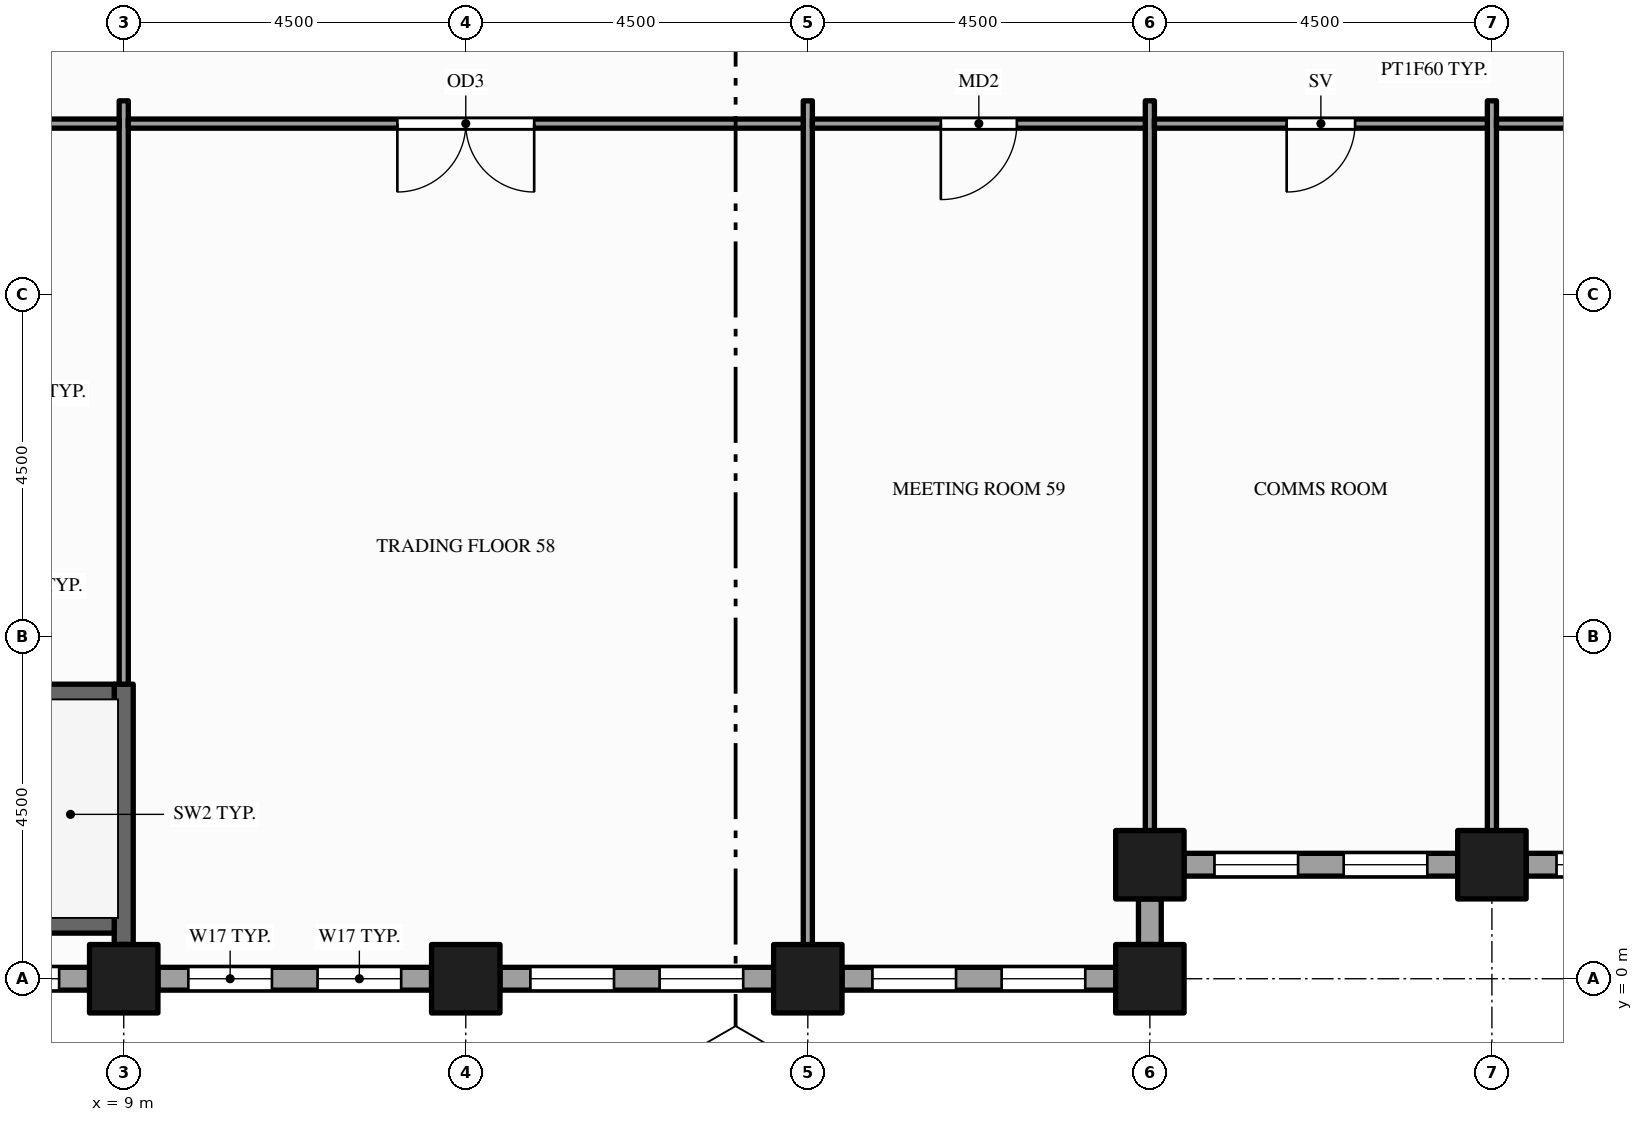
"""IFC4 building model, lengths in metres.
Left out: names, types, materials, properties, quantities, classifications, styles, units other than length and angle.
Written with IfcOpenShell. Run it as: python <this file> out.ifc"""

import sys

from ifc_helpers import new_model, si_unit, direction, frame, frame_2d, origin, origin_2d, place, context, subcontext, project, spatial, rectangle, hollow_rectangle, extrude, element, fill, save


model = new_model("IFC4")
c1 = context("Model", 3, precision=1e-05, world=origin(), true_north=direction((0.0, 1.0)))
c2 = subcontext(c1, "Body", "Model", "MODEL_VIEW")
j1 = project(units=[si_unit("LENGTHUNIT", "METRE"), si_unit("PLANEANGLEUNIT", "RADIAN")], contexts=[c1])
p1 = place(None, origin())
s1 = spatial("IfcSite", under=j1, at=p1, CompositionType="ELEMENT")
p2 = place(p1, origin())
s2 = spatial("IfcBuilding", under=s1, at=p2, CompositionType="ELEMENT")
p3 = place(p2, frame((0.0, 0.0, 155.0)))
s3 = spatial("IfcBuildingStorey", under=s2, at=p3, CompositionType="ELEMENT", Elevation=155.0)
for number, where, z_axis, x_axis in (
    (1, (9.0, 0.0, -0.15), (0.0, 0.0, 1.0), (1.0, 0.0, 0.0)),
    (2, (13.5, 0.0, -0.15), (0.0, 0.0, 1.0), (1.0, 0.0, 0.0)),
    (3, (18.0, 0.0, -0.15), (0.0, 0.0, 1.0), (1.0, 0.0, 0.0)),
    (4, (22.5, 0.0, -0.15), (0.0, 0.0, 1.0), (1.0, 0.0, 0.0)),
    (5, (22.5, 1.5, -0.15), (0.0, 0.0, 1.0), (1.0, 0.0, 0.0)),
    (6, (27.0, 1.5, -0.15), (0.0, 0.0, 1.0), (1.0, 0.0, 0.0)),
):
    element("IfcColumn", number, at=place(p3, frame(where, z_axis=z_axis, x_axis=x_axis)), inside=s3, PredefinedType="COLUMN", context=c2, shape_type="SweptSolid", body=[
        extrude(hollow_rectangle(XDim=0.9, YDim=0.9, WallThickness=0.045, at=origin_2d()), origin(), (0.0, 0.0, 1.0), 4.0),
    ])
p4 = place(p3, frame((4.95, 0.0, 0.0), z_axis=(0.0, 0.0, 1.0), x_axis=(1.0, 0.0, 0.0)))
e7 = element("IfcWall", 7, at=p4, inside=s3, PredefinedType="STANDARD", context=c2, shape_type="SweptSolid", body=[
    extrude(rectangle(XDim=3.6, YDim=0.3, at=frame_2d((1.8, 0.0))), origin(), (0.0, 0.0, 1.0), 3.149),
])
p5 = place(p4, frame((0.4, 0.0, 0.9)))
e8 = element("IfcOpeningElement", 8, at=p5, cuts=e7, PredefinedType="OPENING", context=c2, shape_type="SweptSolid", body=[
    extrude(rectangle(XDim=1.1, YDim=2.0, at=frame_2d((0.55, 1.0))), frame((0.0, 0.16, 0.0), z_axis=(0.0, -1.0, 0.0), x_axis=(1.0, 0.0, 0.0)), (0.0, 0.0, 1.0), 0.32),
])
p6 = place(p4, frame((2.1, 0.0, 0.9)))
e9 = element("IfcOpeningElement", 9, at=p6, cuts=e7, PredefinedType="OPENING", context=c2, shape_type="SweptSolid", body=[
    extrude(rectangle(XDim=1.1, YDim=2.0, at=frame_2d((0.55, 1.0))), frame((0.0, 0.16, 0.0), z_axis=(0.0, -1.0, 0.0), x_axis=(1.0, 0.0, 0.0)), (0.0, 0.0, 1.0), 0.32),
])
p7 = place(p3, frame((9.45, 0.0, 0.0), z_axis=(0.0, 0.0, 1.0), x_axis=(1.0, 0.0, 0.0)))
e10 = element("IfcWall", 10, at=p7, inside=s3, PredefinedType="STANDARD", context=c2, shape_type="SweptSolid", body=[
    extrude(rectangle(XDim=3.6, YDim=0.3, at=frame_2d((1.8, 0.0))), origin(), (0.0, 0.0, 1.0), 2.87),
])
p8 = place(p7, frame((0.4, 0.0, 0.9)))
e11 = element("IfcOpeningElement", 11, at=p8, cuts=e10, PredefinedType="OPENING", context=c2, shape_type="SweptSolid", body=[
    extrude(rectangle(XDim=1.1, YDim=1.75, at=frame_2d((0.55, 0.875))), frame((0.0, 0.16, 0.0), z_axis=(0.0, -1.0, 0.0), x_axis=(1.0, 0.0, 0.0)), (0.0, 0.0, 1.0), 0.32),
])
p9 = place(p7, frame((2.1, 0.0, 0.9)))
e12 = element("IfcOpeningElement", 12, at=p9, cuts=e10, PredefinedType="OPENING", context=c2, shape_type="SweptSolid", body=[
    extrude(rectangle(XDim=1.1, YDim=1.75, at=frame_2d((0.55, 0.875))), frame((0.0, 0.16, 0.0), z_axis=(0.0, -1.0, 0.0), x_axis=(1.0, 0.0, 0.0)), (0.0, 0.0, 1.0), 0.32),
])
p10 = place(p3, frame((13.95, 0.0, 0.0), z_axis=(0.0, 0.0, 1.0), x_axis=(1.0, 0.0, 0.0)))
e13 = element("IfcWall", 13, at=p10, inside=s3, PredefinedType="STANDARD", context=c2, shape_type="SweptSolid", body=[
    extrude(rectangle(XDim=3.6, YDim=0.3, at=frame_2d((1.8, 0.0))), origin(), (0.0, 0.0, 1.0), 2.87),
])
p11 = place(p10, frame((0.4, 0.0, 0.9)))
e14 = element("IfcOpeningElement", 14, at=p11, cuts=e13, PredefinedType="OPENING", context=c2, shape_type="SweptSolid", body=[
    extrude(rectangle(XDim=1.1, YDim=1.75, at=frame_2d((0.55, 0.875))), frame((0.0, 0.16, 0.0), z_axis=(0.0, -1.0, 0.0), x_axis=(1.0, 0.0, 0.0)), (0.0, 0.0, 1.0), 0.32),
])
p12 = place(p10, frame((2.1, 0.0, 0.9)))
e15 = element("IfcOpeningElement", 15, at=p12, cuts=e13, PredefinedType="OPENING", context=c2, shape_type="SweptSolid", body=[
    extrude(rectangle(XDim=1.1, YDim=1.75, at=frame_2d((0.55, 0.875))), frame((0.0, 0.16, 0.0), z_axis=(0.0, -1.0, 0.0), x_axis=(1.0, 0.0, 0.0)), (0.0, 0.0, 1.0), 0.32),
])
p13 = place(p3, frame((18.45, 0.0, 0.0), z_axis=(0.0, 0.0, 1.0), x_axis=(1.0, 0.0, 0.0)))
e16 = element("IfcWall", 16, at=p13, inside=s3, PredefinedType="STANDARD", context=c2, shape_type="SweptSolid", body=[
    extrude(rectangle(XDim=3.6, YDim=0.3, at=frame_2d((1.8, 0.0))), origin(), (0.0, 0.0, 1.0), 2.87),
])
p14 = place(p13, frame((0.4, 0.0, 0.9)))
e17 = element("IfcOpeningElement", 17, at=p14, cuts=e16, PredefinedType="OPENING", context=c2, shape_type="SweptSolid", body=[
    extrude(rectangle(XDim=1.1, YDim=1.75, at=frame_2d((0.55, 0.875))), frame((0.0, 0.16, 0.0), z_axis=(0.0, -1.0, 0.0), x_axis=(1.0, 0.0, 0.0)), (0.0, 0.0, 1.0), 0.32),
])
p15 = place(p13, frame((2.1, 0.0, 0.9)))
e18 = element("IfcOpeningElement", 18, at=p15, cuts=e16, PredefinedType="OPENING", context=c2, shape_type="SweptSolid", body=[
    extrude(rectangle(XDim=1.1, YDim=1.75, at=frame_2d((0.55, 0.875))), frame((0.0, 0.16, 0.0), z_axis=(0.0, -1.0, 0.0), x_axis=(1.0, 0.0, 0.0)), (0.0, 0.0, 1.0), 0.32),
])
p16 = place(p3, frame((22.5, 0.45, 0.0), z_axis=(0.0, 0.0, 1.0), x_axis=(0.0, 1.0, 0.0)))
e19 = element("IfcWall", 19, at=p16, inside=s3, PredefinedType="STANDARD", context=c2, shape_type="SweptSolid", body=[
    extrude(rectangle(XDim=0.6, YDim=0.3, at=frame_2d((0.3, 0.0))), origin(), (0.0, 0.0, 1.0), 3.149),
])
p17 = place(p3, frame((22.95, 1.5, 0.0), z_axis=(0.0, 0.0, 1.0), x_axis=(1.0, 0.0, 0.0)))
e20 = element("IfcWall", 20, at=p17, inside=s3, PredefinedType="STANDARD", context=c2, shape_type="SweptSolid", body=[
    extrude(rectangle(XDim=3.6, YDim=0.3, at=frame_2d((1.8, 0.0))), origin(), (0.0, 0.0, 1.0), 2.87),
])
p18 = place(p17, frame((0.4, 0.0, 0.9)))
e21 = element("IfcOpeningElement", 21, at=p18, cuts=e20, PredefinedType="OPENING", context=c2, shape_type="SweptSolid", body=[
    extrude(rectangle(XDim=1.1, YDim=1.75, at=frame_2d((0.55, 0.875))), frame((0.0, 0.16, 0.0), z_axis=(0.0, -1.0, 0.0), x_axis=(1.0, 0.0, 0.0)), (0.0, 0.0, 1.0), 0.32),
])
p19 = place(p17, frame((2.1, 0.0, 0.9)))
e22 = element("IfcOpeningElement", 22, at=p19, cuts=e20, PredefinedType="OPENING", context=c2, shape_type="SweptSolid", body=[
    extrude(rectangle(XDim=1.1, YDim=1.75, at=frame_2d((0.55, 0.875))), frame((0.0, 0.16, 0.0), z_axis=(0.0, -1.0, 0.0), x_axis=(1.0, 0.0, 0.0)), (0.0, 0.0, 1.0), 0.32),
])
p20 = place(p3, frame((27.45, 1.5, 0.0), z_axis=(0.0, 0.0, 1.0), x_axis=(1.0, 0.0, 0.0)))
e23 = element("IfcWall", 23, at=p20, inside=s3, PredefinedType="STANDARD", context=c2, shape_type="SweptSolid", body=[
    extrude(rectangle(XDim=3.6, YDim=0.3, at=frame_2d((1.8, 0.0))), origin(), (0.0, 0.0, 1.0), 2.87),
])
p21 = place(p20, frame((0.4, 0.0, 0.9)))
e24 = element("IfcOpeningElement", 24, at=p21, cuts=e23, PredefinedType="OPENING", context=c2, shape_type="SweptSolid", body=[
    extrude(rectangle(XDim=1.1, YDim=1.75, at=frame_2d((0.55, 0.875))), frame((0.0, 0.16, 0.0), z_axis=(0.0, -1.0, 0.0), x_axis=(1.0, 0.0, 0.0)), (0.0, 0.0, 1.0), 0.32),
])
p22 = place(p20, frame((2.1, 0.0, 0.9)))
e25 = element("IfcOpeningElement", 25, at=p22, cuts=e23, PredefinedType="OPENING", context=c2, shape_type="SweptSolid", body=[
    extrude(rectangle(XDim=1.1, YDim=1.75, at=frame_2d((0.55, 0.875))), frame((0.0, 0.16, 0.0), z_axis=(0.0, -1.0, 0.0), x_axis=(1.0, 0.0, 0.0)), (0.0, 0.0, 1.0), 0.32),
])
p23 = place(p3, frame((9.0, 0.15, 0.0), z_axis=(0.0, 0.0, 1.0), x_axis=(0.0, 1.0, 0.0)))
e26 = element("IfcWall", 26, at=p23, inside=s3, PredefinedType="PARTITIONING", context=c2, shape_type="SweptSolid", body=[
    extrude(rectangle(XDim=0.3, YDim=0.12, at=frame_2d((0.15, 0.0))), origin(), (0.0, 0.0, 1.0), 3.85),
])
p24 = place(p3, frame((9.0, 0.45, 0.0), z_axis=(0.0, 0.0, 1.0), x_axis=(0.0, 1.0, 0.0)))
e27 = element("IfcWall", 27, at=p24, inside=s3, PredefinedType="SHEAR", context=c2, shape_type="SweptSolid", body=[
    extrude(rectangle(XDim=3.425, YDim=0.25, at=frame_2d((1.712, 0.0))), origin(), (0.0, 0.0, 1.0), 3.85),
])
p25 = place(p3, frame((9.0, 3.875, 0.0), z_axis=(0.0, 0.0, 1.0), x_axis=(0.0, 1.0, 0.0)))
e28 = element("IfcWall", 28, at=p25, inside=s3, PredefinedType="PARTITIONING", context=c2, shape_type="SweptSolid", body=[
    extrude(rectangle(XDim=7.675, YDim=0.12, at=frame_2d((3.837, 0.0))), origin(), (0.0, 0.0, 1.0), 2.87),
])
p26 = place(p3, frame((18.0, 0.15, 0.0), z_axis=(0.0, 0.0, 1.0), x_axis=(0.0, 1.0, 0.0)))
e29 = element("IfcWall", 29, at=p26, inside=s3, PredefinedType="PARTITIONING", context=c2, shape_type="SweptSolid", body=[
    extrude(rectangle(XDim=11.4, YDim=0.12, at=frame_2d((5.7, 0.0))), origin(), (0.0, 0.0, 1.0), 2.87),
])
for number, where, z_axis, x_axis in (
    (30, (22.5, 1.65, 0.0), (0.0, 0.0, 1.0), (0.0, 1.0, 0.0)),
    (31, (27.0, 1.65, 0.0), (0.0, 0.0, 1.0), (0.0, 1.0, 0.0)),
):
    element("IfcWall", number, at=place(p3, frame(where, z_axis=z_axis, x_axis=x_axis)), inside=s3, PredefinedType="PARTITIONING", context=c2, shape_type="SweptSolid", body=[
        extrude(rectangle(XDim=9.9, YDim=0.12, at=frame_2d((4.95, 0.0))), origin(), (0.0, 0.0, 1.0), 2.87),
    ])
p27 = place(p3, frame((0.85, 0.725, 0.0), z_axis=(0.0, 0.0, 1.0), x_axis=(1.0, 0.0, 0.0)))
e32 = element("IfcWall", 32, at=p27, inside=s3, PredefinedType="SHEAR", context=c2, shape_type="SweptSolid", body=[
    extrude(rectangle(XDim=8.025, YDim=0.25, at=frame_2d((4.012, 0.0))), origin(), (0.0, 0.0, 1.0), 3.85),
])
p28 = place(p3, frame((0.85, 3.75, 0.0), z_axis=(0.0, 0.0, 1.0), x_axis=(1.0, 0.0, 0.0)))
e33 = element("IfcWall", 33, at=p28, inside=s3, PredefinedType="SHEAR", context=c2, shape_type="SweptSolid", body=[
    extrude(rectangle(XDim=8.025, YDim=0.25, at=frame_2d((4.012, 0.0))), origin(), (0.0, 0.0, 1.0), 3.85),
])
p29 = place(p28, frame((0.15, 0.0, 0.0)))
e34 = element("IfcOpeningElement", 34, at=p29, cuts=e33, PredefinedType="OPENING", context=c2, shape_type="SweptSolid", body=[
    extrude(rectangle(XDim=1.1, YDim=2.1, at=frame_2d((0.55, 1.05))), frame((0.0, 0.135, 0.0), z_axis=(0.0, -1.0, 0.0), x_axis=(1.0, 0.0, 0.0)), (0.0, 0.0, 1.0), 0.27),
])
p30 = place(p3, frame((0.15, 11.25, 0.0), z_axis=(0.0, 0.0, 1.0), x_axis=(1.0, 0.0, 0.0)))
e35 = element("IfcWall", 35, at=p30, inside=s3, PredefinedType="PARTITIONING", context=c2, shape_type="SweptSolid", body=[
    extrude(rectangle(XDim=8.79, YDim=0.12, at=frame_2d((4.395, 0.0))), origin(), (0.0, 0.0, 1.0), 2.87),
])
p31 = place(p30, frame((3.805, 0.0, 0.0)))
e36 = element("IfcOpeningElement", 36, at=p31, cuts=e35, PredefinedType="OPENING", context=c2, shape_type="SweptSolid", body=[
    extrude(rectangle(XDim=1.2, YDim=2.1, at=frame_2d((0.6, 1.05))), frame((0.0, 0.07, 0.0), z_axis=(0.0, -1.0, 0.0), x_axis=(1.0, 0.0, 0.0)), (0.0, 0.0, 1.0), 0.14),
])
p32 = place(p3, frame((9.06, 11.25, 0.0), z_axis=(0.0, 0.0, 1.0), x_axis=(1.0, 0.0, 0.0)))
e37 = element("IfcWall", 37, at=p32, inside=s3, PredefinedType="PARTITIONING", context=c2, shape_type="SweptSolid", body=[
    extrude(rectangle(XDim=8.88, YDim=0.12, at=frame_2d((4.44, 0.0))), origin(), (0.0, 0.0, 1.0), 2.87),
])
p33 = place(p32, frame((3.54, 0.0, 0.0)))
e38 = element("IfcOpeningElement", 38, at=p33, cuts=e37, PredefinedType="OPENING", context=c2, shape_type="SweptSolid", body=[
    extrude(rectangle(XDim=1.8, YDim=2.1, at=frame_2d((0.9, 1.05))), frame((0.0, 0.07, 0.0), z_axis=(0.0, -1.0, 0.0), x_axis=(1.0, 0.0, 0.0)), (0.0, 0.0, 1.0), 0.14),
])
p34 = place(p3, frame((18.06, 11.25, 0.0), z_axis=(0.0, 0.0, 1.0), x_axis=(1.0, 0.0, 0.0)))
e39 = element("IfcWall", 39, at=p34, inside=s3, PredefinedType="PARTITIONING", context=c2, shape_type="SweptSolid", body=[
    extrude(rectangle(XDim=4.38, YDim=0.12, at=frame_2d((2.19, 0.0))), origin(), (0.0, 0.0, 1.0), 2.87),
])
p35 = place(p34, frame((1.69, 0.0, 0.0)))
e40 = element("IfcOpeningElement", 40, at=p35, cuts=e39, PredefinedType="OPENING", context=c2, shape_type="SweptSolid", body=[
    extrude(rectangle(XDim=1.0, YDim=2.1, at=frame_2d((0.5, 1.05))), frame((0.0, 0.07, 0.0), z_axis=(0.0, -1.0, 0.0), x_axis=(1.0, 0.0, 0.0)), (0.0, 0.0, 1.0), 0.14),
])
p36 = place(p3, frame((22.56, 11.25, 0.0), z_axis=(0.0, 0.0, 1.0), x_axis=(1.0, 0.0, 0.0)))
e41 = element("IfcWall", 41, at=p36, inside=s3, PredefinedType="PARTITIONING", context=c2, shape_type="SweptSolid", body=[
    extrude(rectangle(XDim=4.38, YDim=0.12, at=frame_2d((2.19, 0.0))), origin(), (0.0, 0.0, 1.0), 2.87),
])
p37 = place(p36, frame((1.74, 0.0, 0.0)))
e42 = element("IfcOpeningElement", 42, at=p37, cuts=e41, PredefinedType="OPENING", context=c2, shape_type="SweptSolid", body=[
    extrude(rectangle(XDim=0.9, YDim=2.1, at=frame_2d((0.45, 1.05))), frame((0.0, 0.07, 0.0), z_axis=(0.0, -1.0, 0.0), x_axis=(1.0, 0.0, 0.0)), (0.0, 0.0, 1.0), 0.14),
])
p38 = place(p3, frame((27.06, 11.25, 0.0), z_axis=(0.0, 0.0, 1.0), x_axis=(1.0, 0.0, 0.0)))
e43 = element("IfcWall", 43, at=p38, inside=s3, PredefinedType="PARTITIONING", context=c2, shape_type="SweptSolid", body=[
    extrude(rectangle(XDim=4.38, YDim=0.12, at=frame_2d((2.19, 0.0))), origin(), (0.0, 0.0, 1.0), 2.87),
])
p39 = place(p38, frame((1.74, 0.0, 0.0)))
e44 = element("IfcOpeningElement", 44, at=p39, cuts=e43, PredefinedType="OPENING", context=c2, shape_type="SweptSolid", body=[
    extrude(rectangle(XDim=0.9, YDim=2.1, at=frame_2d((0.45, 1.05))), frame((0.0, 0.07, 0.0), z_axis=(0.0, -1.0, 0.0), x_axis=(1.0, 0.0, 0.0)), (0.0, 0.0, 1.0), 0.14),
])
p40 = place(p6, origin())
e45 = element("IfcWindow", 45, at=p40, inside=s3, PartitioningType="SINGLE_PANEL", PredefinedType="WINDOW", context=c2, shape_type="SweptSolid", body=[
    extrude(rectangle(XDim=1.1, YDim=2.0, at=frame_2d((0.55, 1.0))), frame((0.0, 0.03, 0.0), z_axis=(0.0, -1.0, 0.0), x_axis=(1.0, 0.0, 0.0)), (0.0, 0.0, 1.0), 0.06),
])
fill(e9, e45)
p41 = place(p8, origin())
e46 = element("IfcWindow", 46, at=p41, inside=s3, PartitioningType="SINGLE_PANEL", PredefinedType="WINDOW", context=c2, shape_type="SweptSolid", body=[
    extrude(rectangle(XDim=1.1, YDim=1.75, at=frame_2d((0.55, 0.875))), frame((0.0, 0.03, 0.0), z_axis=(0.0, -1.0, 0.0), x_axis=(1.0, 0.0, 0.0)), (0.0, 0.0, 1.0), 0.06),
])
fill(e11, e46)
p42 = place(p9, origin())
e47 = element("IfcWindow", 47, at=p42, inside=s3, PartitioningType="SINGLE_PANEL", PredefinedType="WINDOW", context=c2, shape_type="SweptSolid", body=[
    extrude(rectangle(XDim=1.1, YDim=1.75, at=frame_2d((0.55, 0.875))), frame((0.0, 0.03, 0.0), z_axis=(0.0, -1.0, 0.0), x_axis=(1.0, 0.0, 0.0)), (0.0, 0.0, 1.0), 0.06),
])
fill(e12, e47)
p43 = place(p11, origin())
e48 = element("IfcWindow", 48, at=p43, inside=s3, PartitioningType="SINGLE_PANEL", PredefinedType="WINDOW", context=c2, shape_type="SweptSolid", body=[
    extrude(rectangle(XDim=1.1, YDim=1.75, at=frame_2d((0.55, 0.875))), frame((0.0, 0.03, 0.0), z_axis=(0.0, -1.0, 0.0), x_axis=(1.0, 0.0, 0.0)), (0.0, 0.0, 1.0), 0.06),
])
fill(e14, e48)
p44 = place(p12, origin())
e49 = element("IfcWindow", 49, at=p44, inside=s3, PartitioningType="SINGLE_PANEL", PredefinedType="WINDOW", context=c2, shape_type="SweptSolid", body=[
    extrude(rectangle(XDim=1.1, YDim=1.75, at=frame_2d((0.55, 0.875))), frame((0.0, 0.03, 0.0), z_axis=(0.0, -1.0, 0.0), x_axis=(1.0, 0.0, 0.0)), (0.0, 0.0, 1.0), 0.06),
])
fill(e15, e49)
p45 = place(p14, origin())
e50 = element("IfcWindow", 50, at=p45, inside=s3, PartitioningType="SINGLE_PANEL", PredefinedType="WINDOW", context=c2, shape_type="SweptSolid", body=[
    extrude(rectangle(XDim=1.1, YDim=1.75, at=frame_2d((0.55, 0.875))), frame((0.0, 0.03, 0.0), z_axis=(0.0, -1.0, 0.0), x_axis=(1.0, 0.0, 0.0)), (0.0, 0.0, 1.0), 0.06),
])
fill(e17, e50)
p46 = place(p15, origin())
e51 = element("IfcWindow", 51, at=p46, inside=s3, PartitioningType="SINGLE_PANEL", PredefinedType="WINDOW", context=c2, shape_type="SweptSolid", body=[
    extrude(rectangle(XDim=1.1, YDim=1.75, at=frame_2d((0.55, 0.875))), frame((0.0, 0.03, 0.0), z_axis=(0.0, -1.0, 0.0), x_axis=(1.0, 0.0, 0.0)), (0.0, 0.0, 1.0), 0.06),
])
fill(e18, e51)
p47 = place(p18, origin())
e52 = element("IfcWindow", 52, at=p47, inside=s3, PartitioningType="SINGLE_PANEL", PredefinedType="WINDOW", context=c2, shape_type="SweptSolid", body=[
    extrude(rectangle(XDim=1.1, YDim=1.75, at=frame_2d((0.55, 0.875))), frame((0.0, 0.03, 0.0), z_axis=(0.0, -1.0, 0.0), x_axis=(1.0, 0.0, 0.0)), (0.0, 0.0, 1.0), 0.06),
])
fill(e21, e52)
p48 = place(p19, origin())
e53 = element("IfcWindow", 53, at=p48, inside=s3, PartitioningType="SINGLE_PANEL", PredefinedType="WINDOW", context=c2, shape_type="SweptSolid", body=[
    extrude(rectangle(XDim=1.1, YDim=1.75, at=frame_2d((0.55, 0.875))), frame((0.0, 0.03, 0.0), z_axis=(0.0, -1.0, 0.0), x_axis=(1.0, 0.0, 0.0)), (0.0, 0.0, 1.0), 0.06),
])
fill(e22, e53)
p49 = place(p21, origin())
e54 = element("IfcWindow", 54, at=p49, inside=s3, PartitioningType="SINGLE_PANEL", PredefinedType="WINDOW", context=c2, shape_type="SweptSolid", body=[
    extrude(rectangle(XDim=1.1, YDim=1.75, at=frame_2d((0.55, 0.875))), frame((0.0, 0.03, 0.0), z_axis=(0.0, -1.0, 0.0), x_axis=(1.0, 0.0, 0.0)), (0.0, 0.0, 1.0), 0.06),
])
fill(e24, e54)
p50 = place(p33, origin())
e55 = element("IfcDoor", 55, at=p50, inside=s3, OperationType="DOUBLE_DOOR_SINGLE_SWING", PredefinedType="DOOR", context=c2, shape_type="SweptSolid", body=[
    extrude(rectangle(XDim=1.8, YDim=2.1, at=frame_2d((0.9, 1.05))), frame((0.0, 0.025, 0.0), z_axis=(0.0, -1.0, 0.0), x_axis=(1.0, 0.0, 0.0)), (0.0, 0.0, 1.0), 0.05),
])
fill(e38, e55)
p51 = place(p35, origin())
e56 = element("IfcDoor", 56, at=p51, inside=s3, OperationType="SINGLE_SWING_LEFT", PredefinedType="DOOR", context=c2, shape_type="SweptSolid", body=[
    extrude(rectangle(XDim=1.0, YDim=2.1, at=frame_2d((0.5, 1.05))), frame((0.0, 0.025, 0.0), z_axis=(0.0, -1.0, 0.0), x_axis=(1.0, 0.0, 0.0)), (0.0, 0.0, 1.0), 0.05),
])
fill(e40, e56)
p52 = place(p37, origin())
e57 = element("IfcDoor", 57, at=p52, inside=s3, OperationType="SINGLE_SWING_LEFT", PredefinedType="DOOR", context=c2, shape_type="SweptSolid", body=[
    extrude(rectangle(XDim=0.9, YDim=2.1, at=frame_2d((0.45, 1.05))), frame((0.0, 0.025, 0.0), z_axis=(0.0, -1.0, 0.0), x_axis=(1.0, 0.0, 0.0)), (0.0, 0.0, 1.0), 0.05),
])
fill(e42, e57)
save(model, sys.argv[1])
